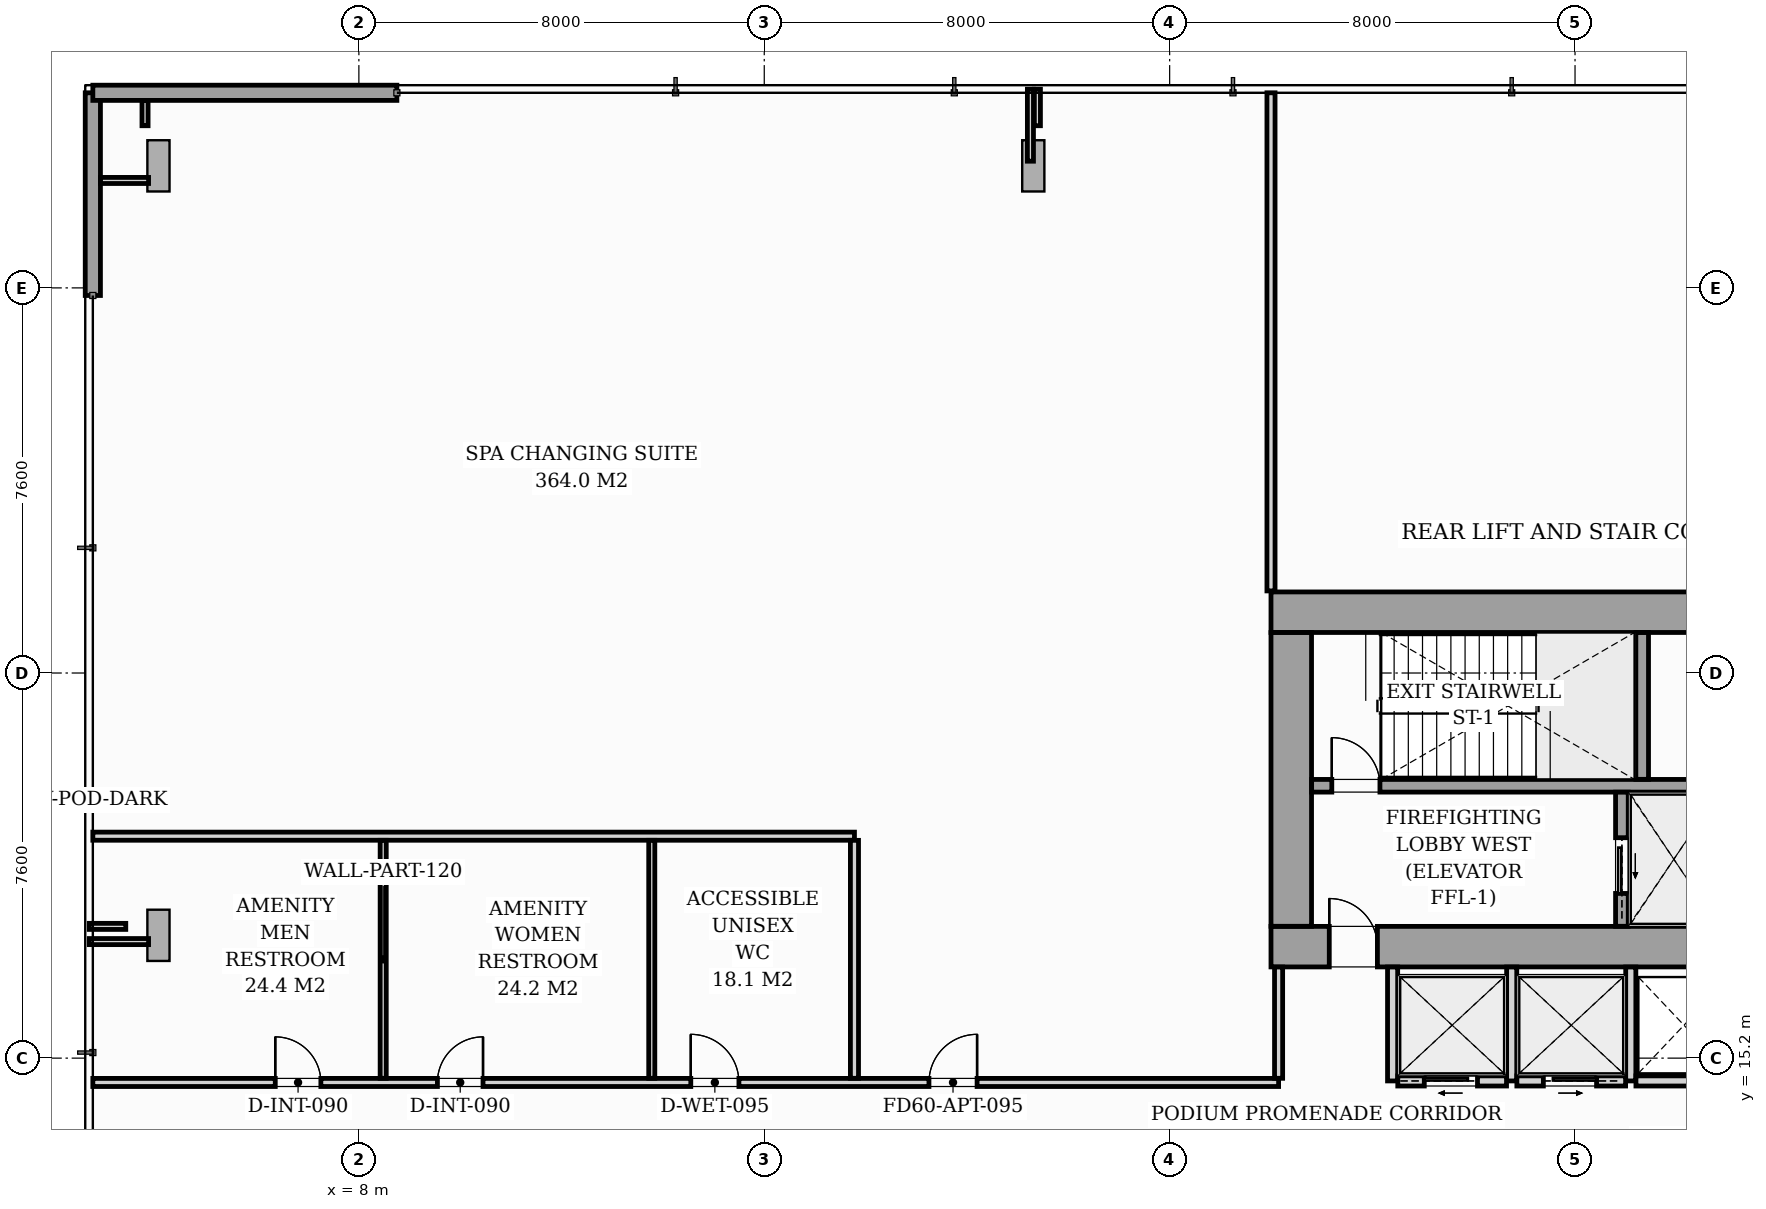
"""IFC4 building model, lengths in metres.
Left out: names, types, materials, properties, quantities, classifications, styles, units other than length and angle.
Written with IfcOpenShell. Run it as: python <this file> out.ifc"""

import sys

from ifc_helpers import new_model, si_unit, direction, frame, frame_2d, origin, origin_2d, place, context, subcontext, project, spatial, rectangle, i_section, extrude, source, transform, mapped, element, fill, save


model = new_model("IFC4")
c1 = context("Model", 3, precision=1e-05, world=origin(), true_north=direction((0.0, 1.0)))
c2 = subcontext(c1, "Body", "Model", "MODEL_VIEW")
j1 = project(units=[si_unit("LENGTHUNIT", "METRE"), si_unit("PLANEANGLEUNIT", "RADIAN")], contexts=[c1])
p1 = place(None, origin())
s1 = spatial("IfcSite", under=j1, at=p1, CompositionType="ELEMENT")
p2 = place(p1, origin())
s2 = spatial("IfcBuilding", under=s1, at=p2, CompositionType="ELEMENT")
p3 = place(p2, frame((0.0, 0.0, 9.5)))
s3 = spatial("IfcBuildingStorey", under=s2, at=p3, CompositionType="ELEMENT", Elevation=9.5)
m1 = source(origin(), c2, "Body", "SweptSolid", [
    extrude(i_section(OverallWidth=0.437, OverallDepth=0.514, WebThickness=0.061, FlangeThickness=0.097, FilletRadius=0.018, at=origin_2d()), origin(), (0.0, 0.0, 1.0), 4.496),
])
for number, where, z_axis, x_axis in (
    (1, (26.4, 17.4, 0.002), (0.0, 0.0, 1.0), (1.0, 0.0, 0.0)),
    (2, (33.12, 17.4, 0.002), (0.0, 0.0, 1.0), (1.0, 0.0, 0.0)),
    (3, (26.4, 24.0, 0.002), (0.0, 0.0, 1.0), (1.0, 0.0, 0.0)),
    (4, (33.12, 24.0, 0.002), (0.0, 0.0, 1.0), (1.0, 0.0, 0.0)),
):
    element("IfcColumn", number, at=place(p3, frame(where, z_axis=z_axis, x_axis=x_axis)), inside=s3, PredefinedType="PILASTER", context=c2, shape_type="MappedRepresentation", body=[
        mapped(m1, transform((0.0, 0.0, 0.0), scale=1.0)),
    ])
m2 = source(origin(), c2, "Body", "SweptSolid", [
    extrude(i_section(OverallWidth=0.438, OverallDepth=1.011, WebThickness=0.041, FlangeThickness=0.074, FilletRadius=0.024, at=origin_2d()), origin(), (0.0, 0.0, 1.0), 4.202),
])
p4 = place(p3, frame((3.801, 33.188, 0.094), z_axis=(0.204277360375, -0.317687316988, 0.925929548434), x_axis=(-0.500789813819, 0.778816468135, 0.37769626863)))
e5 = element("IfcColumn", 5, at=p4, inside=s3, PredefinedType="COLUMN", context=c2, shape_type="MappedRepresentation", body=[
    mapped(m2, transform((0.0, 0.0, 0.0), scale=1.0)),
])
m3 = source(origin(), c2, "Body", "SweptSolid", [
    extrude(i_section(OverallWidth=0.438, OverallDepth=1.011, WebThickness=0.041, FlangeThickness=0.074, FilletRadius=0.024, at=origin_2d()), origin(), (0.0, 0.0, 1.0), 4.144),
])
p5 = place(p3, frame((21.384, 33.191, 0.084), z_axis=(-0.063628687436, -0.32391715141, 0.943943361202), x_axis=(0.18194644336, 0.926242171846, 0.330107453479)))
e6 = element("IfcColumn", 6, at=p5, inside=s3, PredefinedType="COLUMN", context=c2, shape_type="MappedRepresentation", body=[
    mapped(m3, transform((0.0, 0.0, 0.0), scale=1.0)),
])
m4 = source(origin(), c2, "Body", "SweptSolid", [
    extrude(i_section(OverallWidth=0.438, OverallDepth=1.011, WebThickness=0.041, FlangeThickness=0.074, FilletRadius=0.024, at=origin_2d()), origin(), (0.0, 0.0, 1.0), 4.08),
])
p6 = place(p3, frame((3.795, 17.79, 0.068), z_axis=(0.213256785591, -0.142171190394, 0.966596552871), x_axis=(-0.804256946322, 0.536171297548, 0.256302758429)))
e7 = element("IfcColumn", 7, at=p6, inside=s3, PredefinedType="COLUMN", context=c2, shape_type="MappedRepresentation", body=[
    mapped(m4, transform((0.0, 0.0, 0.0), scale=1.0)),
])
p7 = place(p3, frame((2.75, 30.25, 0.0), z_axis=(0.0, 0.0, 1.0), x_axis=(0.0, 1.0, 0.0)))
e8 = element("IfcWall", 8, at=p7, inside=s3, PredefinedType="STANDARD", context=c2, shape_type="SweptSolid", body=[
    extrude(rectangle(XDim=4.0, YDim=0.3, at=frame_2d((2.0, 0.0))), origin(), (0.0, 0.0, 1.0), 4.08),
])
p8 = place(p3, frame((2.75, 34.25, 0.0), z_axis=(0.0, 0.0, 1.0), x_axis=(1.0, 0.0, 0.0)))
e9 = element("IfcWall", 9, at=p8, inside=s3, PredefinedType="STANDARD", context=c2, shape_type="SweptSolid", body=[
    extrude(rectangle(XDim=6.0, YDim=0.3, at=frame_2d((3.0, 0.0))), origin(), (0.0, 0.0, 1.0), 4.08),
])
p9 = place(p3, frame((26.0, 17.4, 0.0), z_axis=(0.0, 0.0, 1.0), x_axis=(1.0, 0.0, 0.0)))
e10 = element("IfcWall", 10, at=p9, inside=s3, PredefinedType="SHEAR", context=c2, shape_type="SweptSolid", body=[
    extrude(rectangle(XDim=20.0, YDim=0.8, at=frame_2d((10.0, 0.0))), origin(), (0.0, 0.0, 1.0), 4.5),
])
p10 = place(p9, frame((1.15, 0.0, 0.0)))
e11 = element("IfcOpeningElement", 11, at=p10, cuts=e10, PredefinedType="OPENING", context=c2, shape_type="SweptSolid", body=[
    extrude(rectangle(XDim=0.95, YDim=2.06, at=frame_2d((0.475, 1.03))), frame((0.0, 0.41, 0.0), z_axis=(0.0, -1.0, 0.0), x_axis=(1.0, 0.0, 0.0)), (0.0, 0.0, 1.0), 0.82),
])
p11 = place(p9, frame((9.58, 0.0, 0.0)))
e12 = element("IfcOpeningElement", 12, at=p11, cuts=e10, PredefinedType="OPENING", context=c2, shape_type="SweptSolid", body=[
    extrude(rectangle(XDim=0.9, YDim=2.06, at=frame_2d((0.45, 1.03))), frame((0.0, 0.41, 0.0), z_axis=(0.0, -1.0, 0.0), x_axis=(1.0, 0.0, 0.0)), (0.0, 0.0, 1.0), 0.82),
])
p12 = place(p9, frame((17.75, 0.0, 0.0)))
e13 = element("IfcOpeningElement", 13, at=p12, cuts=e10, PredefinedType="OPENING", context=c2, shape_type="SweptSolid", body=[
    extrude(rectangle(XDim=0.95, YDim=2.06, at=frame_2d((0.475, 1.03))), frame((0.0, 0.41, 0.0), z_axis=(0.0, -1.0, 0.0), x_axis=(1.0, 0.0, 0.0)), (0.0, 0.0, 1.0), 0.82),
])
p13 = place(p3, frame((26.0, 24.0, 0.0), z_axis=(0.0, 0.0, 1.0), x_axis=(1.0, 0.0, 0.0)))
e14 = element("IfcWall", 14, at=p13, inside=s3, PredefinedType="SHEAR", context=c2, shape_type="SweptSolid", body=[
    extrude(rectangle(XDim=20.0, YDim=0.8, at=frame_2d((10.0, 0.0))), origin(), (0.0, 0.0, 1.0), 4.5),
])
p14 = place(p3, frame((26.4, 17.802, 0.0), z_axis=(0.0, 0.0, 1.0), x_axis=(0.0, 1.0, 0.0)))
e15 = element("IfcWall", 15, at=p14, inside=s3, PredefinedType="SHEAR", context=c2, shape_type="SweptSolid", body=[
    extrude(rectangle(XDim=5.796, YDim=0.8, at=frame_2d((2.898, 0.0))), origin(), (0.0, 0.0, 1.0), 4.5),
])
p15 = place(p3, frame((26.802, 20.575, 0.0), z_axis=(0.0, 0.0, 1.0), x_axis=(1.0, 0.0, 0.0)))
e16 = element("IfcWall", 16, at=p15, inside=s3, PredefinedType="SOLIDWALL", context=c2, shape_type="SweptSolid", body=[
    extrude(rectangle(XDim=8.148, YDim=0.25, at=frame_2d((4.074, 0.0))), origin(), (0.0, 0.0, 1.0), 4.5),
])
p16 = place(p15, frame((0.398, 0.0, 0.0)))
e17 = element("IfcOpeningElement", 17, at=p16, cuts=e16, PredefinedType="OPENING", context=c2, shape_type="SweptSolid", body=[
    extrude(rectangle(XDim=0.95, YDim=2.06, at=frame_2d((0.475, 1.03))), frame((0.0, 0.135, 0.0), z_axis=(0.0, -1.0, 0.0), x_axis=(1.0, 0.0, 0.0)), (0.0, 0.0, 1.0), 0.27),
])
p17 = place(p3, frame((33.325, 20.702, 0.0), z_axis=(0.0, 0.0, 1.0), x_axis=(0.0, 1.0, 0.0)))
e18 = element("IfcWall", 18, at=p17, inside=s3, PredefinedType="SOLIDWALL", context=c2, shape_type="SweptSolid", body=[
    extrude(rectangle(XDim=2.896, YDim=0.25, at=frame_2d((1.448, 0.0))), origin(), (0.0, 0.0, 1.0), 4.5),
])
p18 = place(p3, frame((32.925, 17.802, 0.0), z_axis=(0.0, 0.0, 1.0), x_axis=(0.0, 1.0, 0.0)))
e19 = element("IfcWall", 19, at=p18, inside=s3, PredefinedType="SOLIDWALL", context=c2, shape_type="SweptSolid", body=[
    extrude(rectangle(XDim=2.646, YDim=0.25, at=frame_2d((1.323, 0.0))), origin(), (0.0, 0.0, 1.0), 4.5),
])
p19 = place(p18, frame((0.648, 0.0, 0.0)))
e20 = element("IfcOpeningElement", 20, at=p19, cuts=e19, PredefinedType="OPENING", context=c2, shape_type="SweptSolid", body=[
    extrude(rectangle(XDim=1.1, YDim=2.08, at=frame_2d((0.55, 1.04))), frame((0.0, 0.135, 0.0), z_axis=(0.0, -1.0, 0.0), x_axis=(1.0, 0.0, 0.0)), (0.0, 0.0, 1.0), 0.27),
])
for number, where, z_axis, x_axis in (
    (21, (28.4, 14.75, 0.0), (0.0, 0.0, 1.0), (0.0, 1.0, 0.0)),
    (22, (30.75, 14.75, 0.0), (0.0, 0.0, 1.0), (0.0, 1.0, 0.0)),
    (23, (33.1, 14.75, 0.0), (0.0, 0.0, 1.0), (0.0, 1.0, 0.0)),
):
    element("IfcWall", number, at=place(p3, frame(where, z_axis=z_axis, x_axis=x_axis)), inside=s3, PredefinedType="PARTITIONING", context=c2, shape_type="SweptSolid", body=[
        extrude(rectangle(XDim=2.248, YDim=0.2, at=frame_2d((1.124, 0.0))), origin(), (0.0, 0.0, 1.0), 4.08),
    ])
p20 = place(p3, frame((28.502, 14.75, 0.0), z_axis=(0.0, 0.0, 1.0), x_axis=(1.0, 0.0, 0.0)))
e24 = element("IfcWall", 24, at=p20, inside=s3, PredefinedType="PARTITIONING", context=c2, shape_type="SweptSolid", body=[
    extrude(rectangle(XDim=2.146, YDim=0.2, at=frame_2d((1.073, 0.0))), origin(), (0.0, 0.0, 1.0), 4.08),
])
p21 = place(p20, frame((0.523, 0.0, 0.0)))
e25 = element("IfcOpeningElement", 25, at=p21, cuts=e24, PredefinedType="OPENING", context=c2, shape_type="SweptSolid", body=[
    extrude(rectangle(XDim=1.05, YDim=2.08, at=frame_2d((0.525, 1.04))), frame((0.0, 0.11, 0.0), z_axis=(0.0, -1.0, 0.0), x_axis=(1.0, 0.0, 0.0)), (0.0, 0.0, 1.0), 0.22),
])
p22 = place(p3, frame((30.852, 14.75, 0.0), z_axis=(0.0, 0.0, 1.0), x_axis=(1.0, 0.0, 0.0)))
e26 = element("IfcWall", 26, at=p22, inside=s3, PredefinedType="PARTITIONING", context=c2, shape_type="SweptSolid", body=[
    extrude(rectangle(XDim=2.146, YDim=0.2, at=frame_2d((1.073, 0.0))), origin(), (0.0, 0.0, 1.0), 4.08),
])
p23 = place(p22, frame((0.523, 0.0, 0.0)))
e27 = element("IfcOpeningElement", 27, at=p23, cuts=e26, PredefinedType="OPENING", context=c2, shape_type="SweptSolid", body=[
    extrude(rectangle(XDim=1.05, YDim=2.08, at=frame_2d((0.525, 1.04))), frame((0.0, 0.11, 0.0), z_axis=(0.0, -1.0, 0.0), x_axis=(1.0, 0.0, 0.0)), (0.0, 0.0, 1.0), 0.22),
])
p24 = place(p3, frame((33.202, 14.75, 0.0), z_axis=(0.0, 0.0, 1.0), x_axis=(1.0, 0.0, 0.0)))
e28 = element("IfcWall", 28, at=p24, inside=s3, PredefinedType="PARTITIONING", context=c2, shape_type="SweptSolid", body=[
    extrude(rectangle(XDim=1.896, YDim=0.2, at=frame_2d((0.948, 0.0))), origin(), (0.0, 0.0, 1.0), 4.08),
])
p25 = place(p3, frame((2.75, 14.72, 0.0), z_axis=(0.0, 0.0, 1.0), x_axis=(1.0, 0.0, 0.0)))
e29 = element("IfcWall", 29, at=p25, inside=s3, PredefinedType="PARTITIONING", context=c2, shape_type="SweptSolid", body=[
    extrude(rectangle(XDim=23.4, YDim=0.16, at=frame_2d((11.7, 0.0))), origin(), (0.0, 0.0, 1.0), 4.08),
])
p26 = place(p25, frame((16.5, 0.0, 0.0)))
e30 = element("IfcOpeningElement", 30, at=p26, cuts=e29, PredefinedType="OPENING", context=c2, shape_type="SweptSolid", body=[
    extrude(rectangle(XDim=0.95, YDim=2.06, at=frame_2d((0.475, 1.03))), frame((0.0, 0.09, 0.0), z_axis=(0.0, -1.0, 0.0), x_axis=(1.0, 0.0, 0.0)), (0.0, 0.0, 1.0), 0.18),
])
p27 = place(p25, frame((3.6, 0.0, 0.0)))
e31 = element("IfcOpeningElement", 31, at=p27, cuts=e29, PredefinedType="OPENING", context=c2, shape_type="SweptSolid", body=[
    extrude(rectangle(XDim=0.9, YDim=2.05, at=frame_2d((0.45, 1.025))), frame((0.0, 0.09, 0.0), z_axis=(0.0, -1.0, 0.0), x_axis=(1.0, 0.0, 0.0)), (0.0, 0.0, 1.0), 0.18),
])
p28 = place(p25, frame((6.8, 0.0, 0.0)))
e32 = element("IfcOpeningElement", 32, at=p28, cuts=e29, PredefinedType="OPENING", context=c2, shape_type="SweptSolid", body=[
    extrude(rectangle(XDim=0.9, YDim=2.05, at=frame_2d((0.45, 1.025))), frame((0.0, 0.09, 0.0), z_axis=(0.0, -1.0, 0.0), x_axis=(1.0, 0.0, 0.0)), (0.0, 0.0, 1.0), 0.18),
])
p29 = place(p25, frame((11.8, 0.0, 0.0)))
e33 = element("IfcOpeningElement", 33, at=p29, cuts=e29, PredefinedType="OPENING", context=c2, shape_type="SweptSolid", body=[
    extrude(rectangle(XDim=0.95, YDim=2.1, at=frame_2d((0.475, 1.05))), frame((0.0, 0.09, 0.0), z_axis=(0.0, -1.0, 0.0), x_axis=(1.0, 0.0, 0.0)), (0.0, 0.0, 1.0), 0.18),
])
p30 = place(p3, frame((2.75, 19.58, 0.0), z_axis=(0.0, 0.0, 1.0), x_axis=(1.0, 0.0, 0.0)))
e34 = element("IfcWall", 34, at=p30, inside=s3, PredefinedType="PARTITIONING", context=c2, shape_type="SweptSolid", body=[
    extrude(rectangle(XDim=15.03, YDim=0.16, at=frame_2d((7.515, 0.0))), origin(), (0.0, 0.0, 1.0), 4.08),
])
for number, where, z_axis, x_axis in (
    (35, (8.48, 14.802, 0.0), (0.0, 0.0, 1.0), (0.0, 1.0, 0.0)),
    (36, (13.78, 14.802, 0.0), (0.0, 0.0, 1.0), (0.0, 1.0, 0.0)),
):
    element("IfcWall", number, at=place(p3, frame(where, z_axis=z_axis, x_axis=x_axis)), inside=s3, PredefinedType="PARTITIONING", context=c2, shape_type="SweptSolid", body=[
        extrude(rectangle(XDim=4.696, YDim=0.12, at=frame_2d((2.348, 0.0))), origin(), (0.0, 0.0, 1.0), 4.08),
    ])
p31 = place(p3, frame((17.78, 14.802, 0.0), z_axis=(0.0, 0.0, 1.0), x_axis=(0.0, 1.0, 0.0)))
e37 = element("IfcWall", 37, at=p31, inside=s3, PredefinedType="PARTITIONING", context=c2, shape_type="SweptSolid", body=[
    extrude(rectangle(XDim=4.696, YDim=0.16, at=frame_2d((2.348, 0.0))), origin(), (0.0, 0.0, 1.0), 4.08),
])
p32 = place(p3, frame((26.0, 24.42, 0.0), z_axis=(0.0, 0.0, 1.0), x_axis=(0.0, 1.0, 0.0)))
e38 = element("IfcWall", 38, at=p32, inside=s3, PredefinedType="PARTITIONING", context=c2, shape_type="SweptSolid", body=[
    extrude(rectangle(XDim=9.83, YDim=0.16, at=frame_2d((4.915, 0.0))), origin(), (0.0, 0.0, 1.0), 4.08),
])
p33 = place(p3, frame((26.15, 14.802, 0.0), z_axis=(0.0, 0.0, 1.0), x_axis=(0.0, 1.0, 0.0)))
e39 = element("IfcWall", 39, at=p33, inside=s3, PredefinedType="PARTITIONING", context=c2, shape_type="SweptSolid", body=[
    extrude(rectangle(XDim=2.196, YDim=0.16, at=frame_2d((1.098, 0.0))), origin(), (0.0, 0.0, 1.0), 4.08),
])
p34 = place(p3, frame((3.85, 32.52, 0.0), z_axis=(0.0, 0.0, 1.0), x_axis=(-1.0, 0.0, 0.0)))
e40 = element("IfcWall", 40, at=p34, inside=s3, PredefinedType="PARTITIONING", context=c2, shape_type="SweptSolid", body=[
    extrude(rectangle(XDim=0.948, YDim=0.12, at=frame_2d((0.474, 0.0))), origin(), (0.0, 0.0, 1.0), 4.08),
])
p35 = place(p3, frame((21.252, 32.9, 0.0), z_axis=(0.0, 0.0, 1.0), x_axis=(0.0, 1.0, 0.0)))
e41 = element("IfcWall", 41, at=p35, inside=s3, PredefinedType="PARTITIONING", context=c2, shape_type="SweptSolid", body=[
    extrude(rectangle(XDim=1.42, YDim=0.12, at=frame_2d((0.71, 0.0))), origin(), (0.0, 0.0, 1.0), 4.08),
])
p36 = place(p3, frame((3.85, 17.5, 0.0), z_axis=(0.0, 0.0, 1.0), x_axis=(-1.0, 0.0, 0.0)))
e42 = element("IfcWall", 42, at=p36, inside=s3, PredefinedType="PARTITIONING", context=c2, shape_type="SweptSolid", body=[
    extrude(rectangle(XDim=1.17, YDim=0.12, at=frame_2d((0.585, 0.0))), origin(), (0.0, 0.0, 1.0), 4.08),
])
p37 = place(p3, frame((3.78, 33.6, 0.0), z_axis=(0.0, 0.0, 1.0), x_axis=(0.0, 1.0, 0.0)))
e43 = element("IfcWall", 43, at=p37, inside=s3, PredefinedType="PARTITIONING", context=c2, shape_type="SweptSolid", body=[
    extrude(rectangle(XDim=0.498, YDim=0.12, at=frame_2d((0.249, 0.0))), origin(), (0.0, 0.0, 1.0), 4.08),
])
for number, where, z_axis, x_axis in (
    (44, (21.39, 33.6, 0.0), (0.0, 0.0, 1.0), (0.0, 1.0, 0.0)),
    (45, (3.4, 17.8, 0.0), (0.0, 0.0, 1.0), (-1.0, 0.0, 0.0)),
):
    element("IfcWall", number, at=place(p3, frame(where, z_axis=z_axis, x_axis=x_axis)), inside=s3, PredefinedType="PARTITIONING", context=c2, shape_type="SweptSolid", body=[
        extrude(rectangle(XDim=0.72, YDim=0.12, at=frame_2d((0.36, 0.0))), origin(), (0.0, 0.0, 1.0), 4.08),
    ])
m5 = source(origin(), c2, "Body", "SweptSolid", [
    extrude(rectangle(XDim=0.95, YDim=2.06, at=frame_2d((0.475, 1.03))), frame((0.0, 0.025, 0.0), z_axis=(0.0, -1.0, 0.0), x_axis=(1.0, 0.0, 0.0)), (0.0, 0.0, 1.0), 0.05),
])
p38 = place(p10, origin())
e46 = element("IfcDoor", 46, at=p38, inside=s3, OperationType="SINGLE_SWING_LEFT", PredefinedType="DOOR", context=c2, shape_type="MappedRepresentation", body=[
    mapped(m5, transform((0.0, 0.0, 0.0), scale=1.0)),
])
fill(e11, e46)
p39 = place(p16, origin())
e47 = element("IfcDoor", 47, at=p39, inside=s3, OperationType="SINGLE_SWING_LEFT", PredefinedType="DOOR", context=c2, shape_type="MappedRepresentation", body=[
    mapped(m5, transform((0.0, 0.0, 0.0), scale=1.0)),
])
fill(e17, e47)
m6 = source(origin(), c2, "Body", "SweptSolid", [
    extrude(rectangle(XDim=1.1, YDim=2.08, at=frame_2d((0.55, 1.04))), frame((0.0, 0.025, 0.0), z_axis=(0.0, -1.0, 0.0), x_axis=(1.0, 0.0, 0.0)), (0.0, 0.0, 1.0), 0.05),
])
p40 = place(p19, origin())
e48 = element("IfcDoor", 48, at=p40, inside=s3, OperationType="SLIDING_TO_LEFT", PredefinedType="DOOR", context=c2, shape_type="MappedRepresentation", body=[
    mapped(m6, transform((0.0, 0.0, 0.0), scale=1.0)),
])
fill(e20, e48)
m7 = source(origin(), c2, "Body", "SweptSolid", [
    extrude(rectangle(XDim=1.05, YDim=2.08, at=frame_2d((0.525, 1.04))), frame((0.0, 0.025, 0.0), z_axis=(0.0, -1.0, 0.0), x_axis=(1.0, 0.0, 0.0)), (0.0, 0.0, 1.0), 0.05),
])
p41 = place(p21, origin())
e49 = element("IfcDoor", 49, at=p41, inside=s3, OperationType="SLIDING_TO_LEFT", PredefinedType="DOOR", context=c2, shape_type="MappedRepresentation", body=[
    mapped(m7, transform((0.0, 0.0, 0.0), scale=1.0)),
])
fill(e25, e49)
p42 = place(p23, origin())
e50 = element("IfcDoor", 50, at=p42, inside=s3, OperationType="SLIDING_TO_RIGHT", PredefinedType="DOOR", context=c2, shape_type="MappedRepresentation", body=[
    mapped(m7, transform((0.0, 0.0, 0.0), scale=1.0)),
])
fill(e27, e50)
m8 = source(origin(), c2, "Body", "SweptSolid", [
    extrude(rectangle(XDim=0.95, YDim=2.06, at=frame_2d((0.475, 1.03))), frame((0.0, 0.025, 0.0), z_axis=(0.0, -1.0, 0.0), x_axis=(1.0, 0.0, 0.0)), (0.0, 0.0, 1.0), 0.05),
])
p43 = place(p26, origin())
e51 = element("IfcDoor", 51, at=p43, inside=s3, OperationType="SINGLE_SWING_RIGHT", PredefinedType="DOOR", context=c2, shape_type="MappedRepresentation", body=[
    mapped(m8, transform((0.0, 0.0, 0.0), scale=1.0)),
])
fill(e30, e51)
m9 = source(origin(), c2, "Body", "SweptSolid", [
    extrude(rectangle(XDim=0.9, YDim=2.05, at=frame_2d((0.45, 1.025))), frame((0.0, 0.025, 0.0), z_axis=(0.0, -1.0, 0.0), x_axis=(1.0, 0.0, 0.0)), (0.0, 0.0, 1.0), 0.05),
])
p44 = place(p27, origin())
e52 = element("IfcDoor", 52, at=p44, inside=s3, OperationType="SINGLE_SWING_LEFT", PredefinedType="DOOR", context=c2, shape_type="MappedRepresentation", body=[
    mapped(m9, transform((0.0, 0.0, 0.0), scale=1.0)),
])
fill(e31, e52)
p45 = place(p28, origin())
e53 = element("IfcDoor", 53, at=p45, inside=s3, OperationType="SINGLE_SWING_RIGHT", PredefinedType="DOOR", context=c2, shape_type="MappedRepresentation", body=[
    mapped(m9, transform((0.0, 0.0, 0.0), scale=1.0)),
])
fill(e32, e53)
m10 = source(origin(), c2, "Body", "SweptSolid", [
    extrude(rectangle(XDim=0.95, YDim=2.1, at=frame_2d((0.475, 1.05))), frame((0.0, 0.025, 0.0), z_axis=(0.0, -1.0, 0.0), x_axis=(1.0, 0.0, 0.0)), (0.0, 0.0, 1.0), 0.05),
])
p46 = place(p29, origin())
e54 = element("IfcDoor", 54, at=p46, inside=s3, OperationType="SINGLE_SWING_LEFT", PredefinedType="DOOR", context=c2, shape_type="MappedRepresentation", body=[
    mapped(m10, transform((0.0, 0.0, 0.0), scale=1.0)),
])
fill(e33, e54)
save(model, sys.argv[1])
